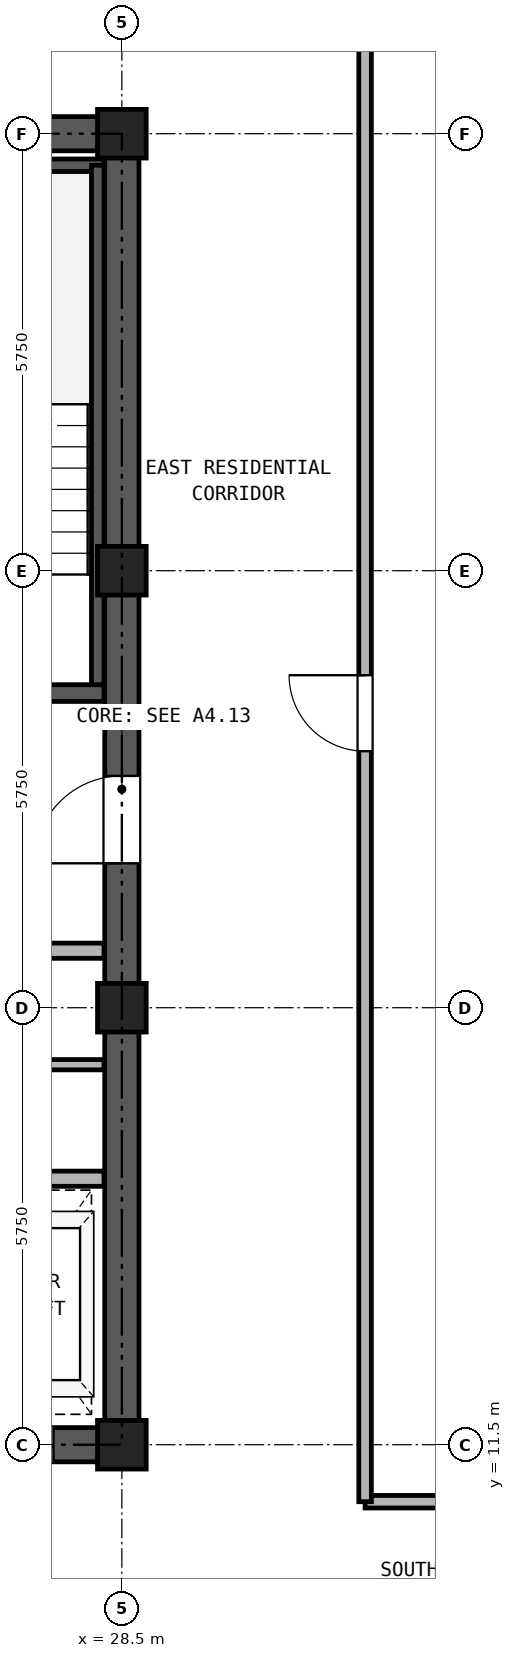
"""IFC4 building model, lengths in metres.
Left out: names, types, materials, properties, quantities, classifications, styles, units other than length and angle.
Written with IfcOpenShell. Run it as: python <this file> out.ifc"""

import sys

from ifc_helpers import new_model, si_unit, direction, frame, frame_2d, origin, origin_2d, place, context, subcontext, project, spatial, rectangle, hollow_rectangle, extrude, source, transform, mapped, element, fill, save


model = new_model("IFC4")
c1 = context("Model", 3, precision=1e-05, world=origin(), true_north=direction((0.0, 1.0)))
c2 = subcontext(c1, "Body", "Model", "MODEL_VIEW")
j1 = project(units=[si_unit("LENGTHUNIT", "METRE"), si_unit("PLANEANGLEUNIT", "RADIAN")], contexts=[c1])
p1 = place(None, origin())
s1 = spatial("IfcSite", under=j1, at=p1, CompositionType="ELEMENT")
p2 = place(p1, origin())
s2 = spatial("IfcBuilding", under=s1, at=p2, CompositionType="ELEMENT")
p3 = place(p2, frame((0.0, 0.0, 212.4)))
s3 = spatial("IfcBuildingStorey", under=s2, at=p3, CompositionType="ELEMENT", Elevation=212.4)
m1 = source(origin(), c2, "Body", "SweptSolid", [
    extrude(hollow_rectangle(XDim=0.64, YDim=0.64, WallThickness=0.035, at=origin_2d()), origin(), (0.0, 0.0, 1.0), 2.84),
])
for number, where, z_axis, x_axis in (
    (1, (28.5, 11.5, 0.0), (0.0, 0.0, 1.0), (1.0, 0.0, 0.0)),
    (2, (28.5, 17.25, 0.0), (0.0, 0.0, 1.0), (1.0, 0.0, 0.0)),
    (3, (28.5, 23.0, 0.0), (0.0, 0.0, 1.0), (1.0, 0.0, 0.0)),
    (4, (28.5, 28.75, 0.0), (0.0, 0.0, 1.0), (1.0, 0.0, 0.0)),
):
    element("IfcColumn", number, at=place(p3, frame(where, z_axis=z_axis, x_axis=x_axis)), inside=s3, PredefinedType="COLUMN", context=c2, shape_type="MappedRepresentation", body=[
        mapped(m1, transform((0.0, 0.0, 0.0), x_axis=(1.0, 0.0, 0.0), y_axis=(0.0, 1.0, 0.0), z_axis=(0.0, 0.0, 1.0), scale=1.0)),
    ])
p4 = place(p3, frame((18.275, 11.5, 0.0), z_axis=(0.0, 0.0, 1.0), x_axis=(1.0, 0.0, 0.0)))
e5 = element("IfcWall", 5, at=p4, inside=s3, PredefinedType="SHEAR", context=c2, shape_type="SweptSolid", body=[
    extrude(rectangle(XDim=10.45, YDim=0.45, at=frame_2d((5.225, 0.0))), origin(), (0.0, 0.0, 1.0), 2.84),
])
p5 = place(p4, frame((1.825, 0.0, 0.0)))
e6 = element("IfcOpeningElement", 6, at=p5, cuts=e5, PredefinedType="OPENING", context=c2, shape_type="SweptSolid", body=[
    extrude(rectangle(XDim=0.95, YDim=2.15, at=frame_2d((0.475, 1.075))), frame((0.0, 0.235, 0.0), z_axis=(0.0, -1.0, 0.0), x_axis=(1.0, 0.0, 0.0)), (0.0, 0.0, 1.0), 0.47),
])
p6 = place(p4, frame((5.325, 0.0, 0.0)))
e7 = element("IfcOpeningElement", 7, at=p6, cuts=e5, PredefinedType="OPENING", context=c2, shape_type="SweptSolid", body=[
    extrude(rectangle(XDim=0.95, YDim=2.15, at=frame_2d((0.475, 1.075))), frame((0.0, 0.235, 0.0), z_axis=(0.0, -1.0, 0.0), x_axis=(1.0, 0.0, 0.0)), (0.0, 0.0, 1.0), 0.47),
])
p7 = place(p4, frame((8.225, 0.0, 0.0)))
e8 = element("IfcOpeningElement", 8, at=p7, cuts=e5, PredefinedType="OPENING", context=c2, shape_type="SweptSolid", body=[
    extrude(rectangle(XDim=1.1, YDim=2.25, at=frame_2d((0.55, 1.125))), frame((0.0, 0.235, 0.0), z_axis=(0.0, -1.0, 0.0), x_axis=(1.0, 0.0, 0.0)), (0.0, 0.0, 1.0), 0.47),
])
p8 = place(p3, frame((18.275, 28.75, 0.0), z_axis=(0.0, 0.0, 1.0), x_axis=(1.0, 0.0, 0.0)))
e9 = element("IfcWall", 9, at=p8, inside=s3, PredefinedType="SHEAR", context=c2, shape_type="SweptSolid", body=[
    extrude(rectangle(XDim=10.45, YDim=0.45, at=frame_2d((5.225, 0.0))), origin(), (0.0, 0.0, 1.0), 2.84),
])
p9 = place(p8, frame((4.105, 0.0, 0.0)))
e10 = element("IfcOpeningElement", 10, at=p9, cuts=e9, PredefinedType="OPENING", context=c2, shape_type="SweptSolid", body=[
    extrude(rectangle(XDim=0.9, YDim=2.05, at=frame_2d((0.45, 1.025))), frame((0.0, 0.235, 0.0), z_axis=(0.0, -1.0, 0.0), x_axis=(1.0, 0.0, 0.0)), (0.0, 0.0, 1.0), 0.47),
])
p10 = place(p8, frame((5.645, 0.0, 0.0)))
e11 = element("IfcOpeningElement", 11, at=p10, cuts=e9, PredefinedType="OPENING", context=c2, shape_type="SweptSolid", body=[
    extrude(rectangle(XDim=0.9, YDim=2.05, at=frame_2d((0.45, 1.025))), frame((0.0, 0.235, 0.0), z_axis=(0.0, -1.0, 0.0), x_axis=(1.0, 0.0, 0.0)), (0.0, 0.0, 1.0), 0.47),
])
p11 = place(p3, frame((28.5, 11.725, 0.0), z_axis=(0.0, 0.0, 1.0), x_axis=(0.0, 1.0, 0.0)))
e12 = element("IfcWall", 12, at=p11, inside=s3, PredefinedType="SHEAR", context=c2, shape_type="SweptSolid", body=[
    extrude(rectangle(XDim=16.8, YDim=0.45, at=frame_2d((8.4, 0.0))), origin(), (0.0, 0.0, 1.0), 2.84),
])
p12 = place(p11, frame((7.425, 0.0, 0.0)))
e13 = element("IfcOpeningElement", 13, at=p12, cuts=e12, PredefinedType="OPENING", context=c2, shape_type="SweptSolid", body=[
    extrude(rectangle(XDim=1.15, YDim=2.2, at=frame_2d((0.575, 1.1))), frame((0.0, 0.235, 0.0), z_axis=(0.0, -1.0, 0.0), x_axis=(1.0, 0.0, 0.0)), (0.0, 0.0, 1.0), 0.47),
])
p13 = place(p3, frame((25.13, 28.335, 0.0), z_axis=(0.0, 0.0, 1.0), x_axis=(1.0, 0.0, 0.0)))
e14 = element("IfcWall", 14, at=p13, inside=s3, PredefinedType="PARTITIONING", context=c2, shape_type="SweptSolid", body=[
    extrude(rectangle(XDim=3.135, YDim=0.165, at=frame_2d((1.567, 0.0))), origin(), (0.0, 0.0, 1.0), 2.84),
])
p14 = place(p3, frame((28.183, 21.39, 0.0), z_axis=(0.0, 0.0, 1.0), x_axis=(0.0, 1.0, 0.0)))
e15 = element("IfcWall", 15, at=p14, inside=s3, PredefinedType="PARTITIONING", context=c2, shape_type="SweptSolid", body=[
    extrude(rectangle(XDim=6.945, YDim=0.165, at=frame_2d((3.473, 0.0))), origin(), (0.0, 0.0, 1.0), 2.84),
])
p15 = place(p3, frame((25.13, 21.39, 0.0), z_axis=(0.0, 0.0, 1.0), x_axis=(1.0, 0.0, 0.0)))
e16 = element("IfcWall", 16, at=p15, inside=s3, PredefinedType="SOLIDWALL", context=c2, shape_type="SweptSolid", body=[
    extrude(rectangle(XDim=3.135, YDim=0.22, at=frame_2d((1.567, 0.0))), origin(), (0.0, 0.0, 1.0), 2.84),
])
p16 = place(p15, frame((0.92, 0.0, 0.0)))
e17 = element("IfcOpeningElement", 17, at=p16, cuts=e16, PredefinedType="OPENING", context=c2, shape_type="SweptSolid", body=[
    extrude(rectangle(XDim=1.15, YDim=2.2, at=frame_2d((0.575, 1.1))), frame((0.0, 0.12, 0.0), z_axis=(0.0, -1.0, 0.0), x_axis=(1.0, 0.0, 0.0)), (0.0, 0.0, 1.0), 0.24),
])
p17 = place(p3, frame((18.735, 18.0, 0.0), z_axis=(0.0, 0.0, 1.0), x_axis=(1.0, 0.0, 0.0)))
e18 = element("IfcWall", 18, at=p17, inside=s3, PredefinedType="PARTITIONING", context=c2, shape_type="SweptSolid", body=[
    extrude(rectangle(XDim=9.53, YDim=0.2, at=frame_2d((4.765, 0.0))), origin(), (0.0, 0.0, 1.0), 2.84),
])
p18 = place(p17, frame((0.515, 0.0, 0.0)))
e19 = element("IfcOpeningElement", 19, at=p18, cuts=e18, PredefinedType="OPENING", context=c2, shape_type="SweptSolid", body=[
    extrude(rectangle(XDim=1.3, YDim=2.3, at=frame_2d((0.65, 1.15))), frame((0.0, 0.11, 0.0), z_axis=(0.0, -1.0, 0.0), x_axis=(1.0, 0.0, 0.0)), (0.0, 0.0, 1.0), 0.22),
])
p19 = place(p17, frame((2.615, 0.0, 0.0)))
e20 = element("IfcOpeningElement", 20, at=p19, cuts=e18, PredefinedType="OPENING", context=c2, shape_type="SweptSolid", body=[
    extrude(rectangle(XDim=1.3, YDim=2.3, at=frame_2d((0.65, 1.15))), frame((0.0, 0.11, 0.0), z_axis=(0.0, -1.0, 0.0), x_axis=(1.0, 0.0, 0.0)), (0.0, 0.0, 1.0), 0.22),
])
p20 = place(p17, frame((7.115, 0.0, 0.0)))
e21 = element("IfcOpeningElement", 21, at=p20, cuts=e18, PredefinedType="OPENING", context=c2, shape_type="SweptSolid", body=[
    extrude(rectangle(XDim=1.0, YDim=2.15, at=frame_2d((0.5, 1.075))), frame((0.0, 0.11, 0.0), z_axis=(0.0, -1.0, 0.0), x_axis=(1.0, 0.0, 0.0)), (0.0, 0.0, 1.0), 0.22),
])
p21 = place(p3, frame((18.735, 15.0, 0.0), z_axis=(0.0, 0.0, 1.0), x_axis=(1.0, 0.0, 0.0)))
e22 = element("IfcWall", 22, at=p21, inside=s3, PredefinedType="PARTITIONING", context=c2, shape_type="SweptSolid", body=[
    extrude(rectangle(XDim=9.53, YDim=0.2, at=frame_2d((4.765, 0.0))), origin(), (0.0, 0.0, 1.0), 2.84),
])
p22 = place(p3, frame((23.3, 16.5, 0.0), z_axis=(0.0, 0.0, 1.0), x_axis=(1.0, 0.0, 0.0)))
e23 = element("IfcWall", 23, at=p22, inside=s3, PredefinedType="PARTITIONING", context=c2, shape_type="SweptSolid", body=[
    extrude(rectangle(XDim=4.965, YDim=0.135, at=frame_2d((2.482, 0.0))), origin(), (0.0, 0.0, 1.0), 2.84),
])
p23 = place(p22, frame((2.55, 0.0, 0.0)))
e24 = element("IfcOpeningElement", 24, at=p23, cuts=e23, PredefinedType="OPENING", context=c2, shape_type="SweptSolid", body=[
    extrude(rectangle(XDim=0.9, YDim=2.05, at=frame_2d((0.45, 1.025))), frame((0.0, 0.077, 0.0), z_axis=(0.0, -1.0, 0.0), x_axis=(1.0, 0.0, 0.0)), (0.0, 0.0, 1.0), 0.155),
])
p24 = place(p3, frame((31.7, 10.75, 0.0), z_axis=(0.0, 0.0, 1.0), x_axis=(1.0, 0.0, 0.0)))
e25 = element("IfcWall", 25, at=p24, inside=s3, PredefinedType="PARTITIONING", context=c2, shape_type="SweptSolid", body=[
    extrude(rectangle(XDim=6.5, YDim=0.165, at=frame_2d((3.25, 0.0))), origin(), (0.0, 0.0, 1.0), 2.84),
])
p25 = place(p3, frame((31.7, 10.75, 0.0), z_axis=(0.0, 0.0, 1.0), x_axis=(0.0, 1.0, 0.0)))
e26 = element("IfcWall", 26, at=p25, inside=s3, PredefinedType="PARTITIONING", context=c2, shape_type="SweptSolid", body=[
    extrude(rectangle(XDim=24.39, YDim=0.165, at=frame_2d((12.195, 0.0))), origin(), (0.0, 0.0, 1.0), 2.84),
])
p26 = place(p25, frame((9.875, 0.0, 0.0)))
e27 = element("IfcOpeningElement", 27, at=p26, cuts=e26, PredefinedType="OPENING", context=c2, shape_type="SweptSolid", body=[
    extrude(rectangle(XDim=1.0, YDim=2.15, at=frame_2d((0.5, 1.075))), frame((0.0, 0.093, 0.0), z_axis=(0.0, -1.0, 0.0), x_axis=(1.0, 0.0, 0.0)), (0.0, 0.0, 1.0), 0.185),
])
p27 = place(p12, origin())
e28 = element("IfcDoor", 28, at=p27, inside=s3, OperationType="SINGLE_SWING_LEFT", PredefinedType="DOOR", context=c2, shape_type="SweptSolid", body=[
    extrude(rectangle(XDim=1.15, YDim=2.2, at=frame_2d((0.575, 1.1))), frame((0.0, 0.025, 0.0), z_axis=(0.0, -1.0, 0.0), x_axis=(1.0, 0.0, 0.0)), (0.0, 0.0, 1.0), 0.05),
])
fill(e13, e28)
p28 = place(p7, frame((1.1, 0.0, 0.0), z_axis=(0.0, 0.0, 1.0), x_axis=(-1.0, 0.0, 0.0)))
e29 = element("IfcDoor", 29, at=p28, inside=s3, OperationType="DOUBLE_DOOR_SLIDING", PredefinedType="DOOR", context=c2, shape_type="SweptSolid", body=[
    extrude(rectangle(XDim=1.1, YDim=2.25, at=frame_2d((0.55, 1.125))), frame((0.0, 0.025, 0.0), z_axis=(0.0, -1.0, 0.0), x_axis=(1.0, 0.0, 0.0)), (0.0, 0.0, 1.0), 0.05),
])
fill(e8, e29)
p29 = place(p26, frame((1.0, 0.0, 0.0), z_axis=(0.0, 0.0, 1.0), x_axis=(-1.0, 0.0, 0.0)))
e30 = element("IfcDoor", 30, at=p29, inside=s3, OperationType="SINGLE_SWING_RIGHT", PredefinedType="DOOR", context=c2, shape_type="SweptSolid", body=[
    extrude(rectangle(XDim=1.0, YDim=2.15, at=frame_2d((0.5, 1.075))), frame((0.0, 0.025, 0.0), z_axis=(0.0, -1.0, 0.0), x_axis=(1.0, 0.0, 0.0)), (0.0, 0.0, 1.0), 0.05),
])
fill(e27, e30)
save(model, sys.argv[1])
